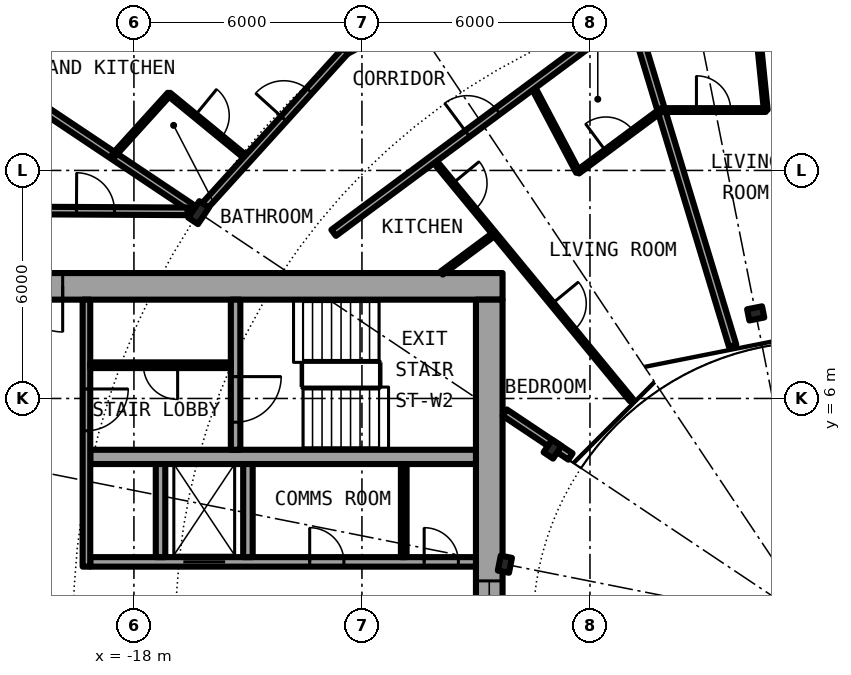
"""IFC4 building model, lengths in metres.
Left out: names, types, materials, properties, quantities, classifications, styles, units other than length and angle.
Written with IfcOpenShell. Run it as: python <this file> out.ifc"""

import sys

from ifc_helpers import new_model, si_unit, direction, frame, frame_2d, origin, origin_2d, place, context, subcontext, project, spatial, rectangle, i_section, extrude, element, fill, save


model = new_model("IFC4")
c1 = context("Model", 3, precision=1e-05, world=origin(), true_north=direction((0.0, 1.0)))
c2 = subcontext(c1, "Body", "Model", "MODEL_VIEW")
j1 = project(units=[si_unit("LENGTHUNIT", "METRE"), si_unit("PLANEANGLEUNIT", "RADIAN")], contexts=[c1])
p1 = place(None, origin())
s1 = spatial("IfcSite", under=j1, at=p1, CompositionType="ELEMENT")
p2 = place(p1, origin())
s2 = spatial("IfcBuilding", under=s1, at=p2, CompositionType="ELEMENT")
p3 = place(p2, frame((0.0, 0.0, 75.8)))
s3 = spatial("IfcBuildingStorey", under=s2, at=p3, CompositionType="ELEMENT", Elevation=75.8)
p4 = place(p3, frame((-16.297, 10.889, 0.0), z_axis=(0.0, 0.0, 1.0), x_axis=(-0.831469612303, 0.55557023302, 0.0)))
e1 = element("IfcColumn", 1, at=p4, inside=s3, PredefinedType="COLUMN", context=c2, shape_type="SweptSolid", body=[
    extrude(i_section(OverallWidth=0.306, OverallDepth=0.524, WebThickness=0.021, FlangeThickness=0.04, FilletRadius=0.027, at=origin_2d()), origin(), (0.0, 0.0, 1.0), 3.05),
])
for number, where, z_axis, x_axis in (
    (2, (-1.639, 8.239, 0.0), (0.0, 0.0, 1.0), (-0.195, 0.981, 0.0)),
    (3, (-6.984, 4.667, 0.0), (0.0, 0.0, 1.0), (-0.831, 0.556, 0.0)),
    (4, (-8.239, 1.639, 0.0), (0.0, 0.0, 1.0), (-0.981, 0.195, 0.0)),
):
    element("IfcColumn", number, at=place(p3, frame(where, z_axis=z_axis, x_axis=x_axis)), inside=s3, PredefinedType="COLUMN", context=c2, shape_type="SweptSolid", body=[
        extrude(i_section(OverallWidth=0.3, OverallDepth=0.4, WebThickness=0.013, FlangeThickness=0.024, FilletRadius=0.027, at=origin_2d()), origin(), (0.0, 0.0, 1.0), 3.05),
    ])
p5 = place(p3, frame((-19.304, 19.304, 0.0), z_axis=(0.0, 0.0, 1.0), x_axis=(-0.634382322723, -0.773019449054, 0.0)))
e5 = element("IfcWall", 5, at=p5, inside=s3, PredefinedType="SOLIDWALL", context=c2, shape_type="SweptSolid", body=[
    extrude(rectangle(XDim=5.352, YDim=0.25, at=frame_2d((2.676, 0.0))), origin(), (0.0, 0.0, 1.0), 2.7),
])
p6 = place(p5, frame((0.441, 0.0, 0.3)))
e6 = element("IfcOpeningElement", 6, at=p6, cuts=e5, PredefinedType="OPENING", context=c2, shape_type="SweptSolid", body=[
    extrude(rectangle(XDim=1.8, YDim=2.1, at=frame_2d((0.9, 1.05))), frame((0.0, 0.135, 0.0), z_axis=(0.0, -1.0, 0.0), x_axis=(1.0, 0.0, 0.0)), (0.0, 0.0, 1.0), 0.27),
])
p7 = place(p5, frame((3.51, 0.0, 0.0)))
e7 = element("IfcOpeningElement", 7, at=p7, cuts=e5, PredefinedType="OPENING", context=c2, shape_type="SweptSolid", body=[
    extrude(rectangle(XDim=1.0, YDim=2.2, at=frame_2d((0.5, 1.1))), frame((0.0, 0.135, 0.0), z_axis=(0.0, -1.0, 0.0), x_axis=(1.0, 0.0, 0.0)), (0.0, 0.0, 1.0), 0.27),
])
p8 = place(p3, frame((-8.3, 8.95, 0.0), z_axis=(0.0, 0.0, 1.0), x_axis=(-1.0, 0.0, 0.0)))
e8 = element("IfcWall", 8, at=p8, inside=s3, PredefinedType="SHEAR", context=c2, shape_type="SweptSolid", body=[
    extrude(rectangle(XDim=14.0, YDim=0.7, at=frame_2d((7.0, 0.0))), origin(), (0.0, 0.0, 1.0), 3.05),
])
p9 = place(p8, frame((11.575, 0.0, 0.0)))
e9 = element("IfcOpeningElement", 9, at=p9, cuts=e8, PredefinedType="OPENING", context=c2, shape_type="SweptSolid", body=[
    extrude(rectangle(XDim=1.2, YDim=2.3, at=frame_2d((0.6, 1.15))), frame((0.0, 0.36, 0.0), z_axis=(0.0, -1.0, 0.0), x_axis=(1.0, 0.0, 0.0)), (0.0, 0.0, 1.0), 0.72),
])
p10 = place(p3, frame((-8.65, 8.6, 0.0), z_axis=(0.0, 0.0, 1.0), x_axis=(0.0, -1.0, 0.0)))
e10 = element("IfcWall", 10, at=p10, inside=s3, PredefinedType="SHEAR", context=c2, shape_type="SweptSolid", body=[
    extrude(rectangle(XDim=17.2, YDim=0.7, at=frame_2d((8.6, 0.0))), origin(), (0.0, 0.0, 1.0), 3.05),
])
p11 = place(p10, frame((7.4, 0.0, 0.1)))
e11 = element("IfcOpeningElement", 11, at=p11, cuts=e10, PredefinedType="OPENING", context=c2, shape_type="SweptSolid", body=[
    extrude(rectangle(XDim=2.4, YDim=2.2, at=frame_2d((1.2, 1.1))), frame((0.0, 0.36, 0.0), z_axis=(0.0, -1.0, 0.0), x_axis=(1.0, 0.0, 0.0)), (0.0, 0.0, 1.0), 0.72),
])
p12 = place(p3, frame((-19.15, 1.7, 0.0), z_axis=(0.0, 0.0, 1.0), x_axis=(1.0, 0.0, 0.0)))
e12 = element("IfcWall", 12, at=p12, inside=s3, PredefinedType="SHEAR", context=c2, shape_type="SweptSolid", body=[
    extrude(rectangle(XDim=10.15, YDim=0.25, at=frame_2d((5.075, 0.0))), origin(), (0.0, 0.0, 1.0), 3.05),
])
p13 = place(p12, frame((2.45, 0.0, 0.0)))
e13 = element("IfcOpeningElement", 13, at=p13, cuts=e12, PredefinedType="OPENING", context=c2, shape_type="SweptSolid", body=[
    extrude(rectangle(XDim=1.1, YDim=2.3, at=frame_2d((0.55, 1.15))), frame((0.0, 0.135, 0.0), z_axis=(0.0, -1.0, 0.0), x_axis=(1.0, 0.0, 0.0)), (0.0, 0.0, 1.0), 0.27),
])
p14 = place(p12, frame((8.788, 0.0, 0.0)))
e14 = element("IfcOpeningElement", 14, at=p14, cuts=e12, PredefinedType="OPENING", context=c2, shape_type="SweptSolid", body=[
    extrude(rectangle(XDim=0.9, YDim=2.3, at=frame_2d((0.45, 1.15))), frame((0.0, 0.135, 0.0), z_axis=(0.0, -1.0, 0.0), x_axis=(1.0, 0.0, 0.0)), (0.0, 0.0, 1.0), 0.27),
])
p15 = place(p12, frame((5.775, 0.0, 0.0)))
e15 = element("IfcOpeningElement", 15, at=p15, cuts=e12, PredefinedType="OPENING", context=c2, shape_type="SweptSolid", body=[
    extrude(rectangle(XDim=0.9, YDim=2.3, at=frame_2d((0.45, 1.15))), frame((0.0, 0.135, 0.0), z_axis=(0.0, -1.0, 0.0), x_axis=(1.0, 0.0, 0.0)), (0.0, 0.0, 1.0), 0.27),
])
p16 = place(p3, frame((-9.0, 4.462, 0.0), z_axis=(0.0, 0.0, 1.0), x_axis=(-1.0, 0.0, 0.0)))
e16 = element("IfcWall", 16, at=p16, inside=s3, PredefinedType="SHEAR", context=c2, shape_type="SweptSolid", body=[
    extrude(rectangle(XDim=10.15, YDim=0.375, at=frame_2d((5.075, 0.0))), origin(), (0.0, 0.0, 1.0), 3.05),
])
p17 = place(p3, frame((-15.325, 8.6, 0.0), z_axis=(0.0, 0.0, 1.0), x_axis=(0.0, -1.0, 0.0)))
e17 = element("IfcWall", 17, at=p17, inside=s3, PredefinedType="SHEAR", context=c2, shape_type="SweptSolid", body=[
    extrude(rectangle(XDim=3.95, YDim=0.25, at=frame_2d((1.975, 0.0))), origin(), (0.0, 0.0, 1.0), 3.05),
])
p18 = place(p17, frame((2.025, 0.0, 0.0)))
e18 = element("IfcOpeningElement", 18, at=p18, cuts=e17, PredefinedType="OPENING", context=c2, shape_type="SweptSolid", body=[
    extrude(rectangle(XDim=1.2, YDim=2.3, at=frame_2d((0.6, 1.15))), frame((0.0, 0.135, 0.0), z_axis=(0.0, -1.0, 0.0), x_axis=(1.0, 0.0, 0.0)), (0.0, 0.0, 1.0), 0.27),
])
for number, where, z_axis, x_axis in (
    (19, (-15.0, 1.825, 0.0), (0.0, 0.0, 1.0), (0.0, 1.0, 0.0)),
    (20, (-17.3, 1.825, 0.0), (0.0, 0.0, 1.0), (0.0, 1.0, 0.0)),
):
    element("IfcWall", number, at=place(p3, frame(where, z_axis=z_axis, x_axis=x_axis)), inside=s3, PredefinedType="SOLIDWALL", context=c2, shape_type="SweptSolid", body=[
        extrude(rectangle(XDim=2.45, YDim=0.25, at=frame_2d((1.225, 0.0))), origin(), (0.0, 0.0, 1.0), 2.7),
    ])
p19 = place(p3, frame((-19.25, 8.6, 0.0), z_axis=(0.0, 0.0, 1.0), x_axis=(0.0, -1.0, 0.0)))
e21 = element("IfcWall", 21, at=p19, inside=s3, PredefinedType="SOLIDWALL", context=c2, shape_type="SweptSolid", body=[
    extrude(rectangle(XDim=7.025, YDim=0.2, at=frame_2d((3.513, 0.0))), origin(), (0.0, 0.0, 1.0), 2.7),
])
p20 = place(p19, frame((2.35, 0.0, 0.0)))
e22 = element("IfcOpeningElement", 22, at=p20, cuts=e21, PredefinedType="OPENING", context=c2, shape_type="SweptSolid", body=[
    extrude(rectangle(XDim=1.1, YDim=2.3, at=frame_2d((0.55, 1.15))), frame((0.0, 0.11, 0.0), z_axis=(0.0, -1.0, 0.0), x_axis=(1.0, 0.0, 0.0)), (0.0, 0.0, 1.0), 0.22),
])
p21 = place(p3, frame((-10.9, 1.825, 0.0), z_axis=(0.0, 0.0, 1.0), x_axis=(0.0, 1.0, 0.0)))
e23 = element("IfcWall", 23, at=p21, inside=s3, PredefinedType="PARTITIONING", context=c2, shape_type="SweptSolid", body=[
    extrude(rectangle(XDim=2.45, YDim=0.15, at=frame_2d((1.225, 0.0))), origin(), (0.0, 0.0, 1.0), 2.7),
])
p22 = place(p3, frame((-15.45, 6.875, 0.0), z_axis=(0.0, 0.0, 1.0), x_axis=(-1.0, 0.0, 0.0)))
e24 = element("IfcWall", 24, at=p22, inside=s3, PredefinedType="PARTITIONING", context=c2, shape_type="SweptSolid", body=[
    extrude(rectangle(XDim=3.7, YDim=0.15, at=frame_2d((1.85, 0.0))), origin(), (0.0, 0.0, 1.0), 2.7),
])
p23 = place(p22, frame((1.4, 0.0, 0.0)))
e25 = element("IfcOpeningElement", 25, at=p23, cuts=e24, PredefinedType="OPENING", context=c2, shape_type="SweptSolid", body=[
    extrude(rectangle(XDim=0.9, YDim=2.3, at=frame_2d((0.45, 1.15))), frame((0.0, 0.085, 0.0), z_axis=(0.0, -1.0, 0.0), x_axis=(1.0, 0.0, 0.0)), (0.0, 0.0, 1.0), 0.17),
])
p24 = place(p3, frame((-22.595, 15.098, 0.0), z_axis=(0.0, 0.0, 1.0), x_axis=(0.831382022135, -0.555701298605, 0.0)))
e26 = element("IfcWall", 26, at=p24, inside=s3, PredefinedType="PARTITIONING", context=c2, shape_type="SweptSolid", body=[
    extrude(rectangle(XDim=7.313, YDim=0.2, at=frame_2d((3.657, 0.0))), origin(), (0.0, 0.0, 1.0), 2.7),
])
p25 = place(p3, frame((-4.907, 16.172, 0.0), z_axis=(0.0, 0.0, 1.0), x_axis=(0.289977130626, -0.957033575019, 0.0)))
e27 = element("IfcWall", 27, at=p25, inside=s3, PredefinedType="PARTITIONING", context=c2, shape_type="SweptSolid", body=[
    extrude(rectangle(XDim=9.18, YDim=0.2, at=frame_2d((4.59, 0.0))), origin(), (0.0, 0.0, 1.0), 2.7),
])
p26 = place(p3, frame((-17.243, 21.005, 0.0), z_axis=(0.0, 0.0, 1.0), x_axis=(0.63447412651, -0.772944100689, 0.0)))
e28 = element("IfcWall", 28, at=p26, inside=s3, PredefinedType="PARTITIONING", context=c2, shape_type="SweptSolid", body=[
    extrude(rectangle(XDim=7.576, YDim=0.2, at=frame_2d((3.788, 0.0))), origin(), (0.0, 0.0, 1.0), 2.7),
])
p27 = place(p3, frame((-17.078, 14.005, 0.0), z_axis=(0.0, 0.0, 1.0), x_axis=(0.773240932873, -0.634112339992, 0.0)))
e29 = element("IfcWall", 29, at=p27, inside=s3, PredefinedType="PARTITIONING", context=c2, shape_type="SweptSolid", body=[
    extrude(rectangle(XDim=2.674, YDim=0.1, at=frame_2d((1.337, 0.0))), origin(), (0.0, 0.0, 1.0), 2.7),
])
p28 = place(p27, frame((0.887, 0.0, 0.0)))
e30 = element("IfcOpeningElement", 30, at=p28, cuts=e29, PredefinedType="OPENING", context=c2, shape_type="SweptSolid", body=[
    extrude(rectangle(XDim=0.9, YDim=2.3, at=frame_2d((0.45, 1.15))), frame((0.0, 0.06, 0.0), z_axis=(0.0, -1.0, 0.0), x_axis=(1.0, 0.0, 0.0)), (0.0, 0.0, 1.0), 0.12),
])
p29 = place(p3, frame((-10.132, 12.296, 0.0), z_axis=(0.0, 0.0, 1.0), x_axis=(0.635976043025, -0.771708800454, 0.0)))
e31 = element("IfcWall", 31, at=p29, inside=s3, PredefinedType="PARTITIONING", context=c2, shape_type="SweptSolid", body=[
    extrude(rectangle(XDim=8.213, YDim=0.1, at=frame_2d((4.106, 0.0))), origin(), (0.0, 0.0, 1.0), 2.7),
])
p30 = place(p29, frame((0.823, 0.0, 0.0)))
e32 = element("IfcOpeningElement", 32, at=p30, cuts=e31, PredefinedType="OPENING", context=c2, shape_type="SweptSolid", body=[
    extrude(rectangle(XDim=0.9, YDim=2.3, at=frame_2d((0.45, 1.15))), frame((0.0, 0.06, 0.0), z_axis=(0.0, -1.0, 0.0), x_axis=(1.0, 0.0, 0.0)), (0.0, 0.0, 1.0), 0.12),
])
p31 = place(p29, frame((4.929, 0.0, 0.0)))
e33 = element("IfcOpeningElement", 33, at=p31, cuts=e31, PredefinedType="OPENING", context=c2, shape_type="SweptSolid", body=[
    extrude(rectangle(XDim=0.9, YDim=2.3, at=frame_2d((0.45, 1.15))), frame((0.0, 0.06, 0.0), z_axis=(0.0, -1.0, 0.0), x_axis=(1.0, 0.0, 0.0)), (0.0, 0.0, 1.0), 0.12),
])
p32 = place(p3, frame((-7.519, 14.234, 0.0), z_axis=(0.0, 0.0, 1.0), x_axis=(0.467001992543, -0.884256263173, 0.0)))
e34 = element("IfcWall", 34, at=p32, inside=s3, PredefinedType="PARTITIONING", context=c2, shape_type="SweptSolid", body=[
    extrude(rectangle(XDim=2.572, YDim=0.1, at=frame_2d((1.286, 0.0))), origin(), (0.0, 0.0, 1.0), 2.7),
])
p33 = place(p3, frame((-1.635, 16.172, 0.0), z_axis=(0.0, 0.0, 1.0), x_axis=(0.100527855112, -0.994934244233, 0.0)))
e35 = element("IfcWall", 35, at=p33, inside=s3, PredefinedType="PARTITIONING", context=c2, shape_type="SweptSolid", body=[
    extrude(rectangle(XDim=2.596, YDim=0.1, at=frame_2d((1.298, 0.0))), origin(), (0.0, 0.0, 1.0), 2.7),
])
p34 = place(p3, frame((-6.513, 4.472, 0.0), z_axis=(0.0, 0.0, 1.0), x_axis=(-0.831382204863, 0.555701025225, 0.0)))
e36 = element("IfcWall", 36, at=p34, inside=s3, PredefinedType="PARTITIONING", context=c2, shape_type="SweptSolid", body=[
    extrude(rectangle(XDim=2.082, YDim=0.2, at=frame_2d((1.041, 0.0))), origin(), (0.0, 0.0, 1.0), 2.7),
])
p35 = place(p3, frame((-21.675, 10.95, 0.0), z_axis=(0.0, 0.0, 1.0), x_axis=(0.999987054722, -0.005088259783, 0.0)))
e37 = element("IfcWall", 37, at=p35, inside=s3, PredefinedType="PARTITIONING", context=c2, shape_type="SweptSolid", body=[
    extrude(rectangle(XDim=5.086, YDim=0.2, at=frame_2d((2.543, 0.0))), origin(), (0.0, 0.0, 1.0), 2.7),
])
p36 = place(p35, frame((2.163, 0.0, 0.0)))
e38 = element("IfcOpeningElement", 38, at=p36, cuts=e37, PredefinedType="OPENING", context=c2, shape_type="SweptSolid", body=[
    extrude(rectangle(XDim=1.0, YDim=2.3, at=frame_2d((0.5, 1.15))), frame((0.0, 0.11, 0.0), z_axis=(0.0, -1.0, 0.0), x_axis=(1.0, 0.0, 0.0)), (0.0, 0.0, 1.0), 0.22),
])
p37 = place(p3, frame((-9.903, 9.3, 0.0), z_axis=(0.0, 0.0, 1.0), x_axis=(0.803135014325, 0.595797070121, 0.0)))
e39 = element("IfcWall", 39, at=p37, inside=s3, PredefinedType="PARTITIONING", context=c2, shape_type="SweptSolid", body=[
    extrude(rectangle(XDim=1.732, YDim=0.1, at=frame_2d((0.866, 0.0))), origin(), (0.0, 0.0, 1.0), 2.7),
])
p38 = place(p3, frame((-6.318, 11.96, 0.0), z_axis=(0.0, 0.0, 1.0), x_axis=(0.803128348509, 0.595806055542, 0.0)))
e40 = element("IfcWall", 40, at=p38, inside=s3, PredefinedType="PARTITIONING", context=c2, shape_type="SweptSolid", body=[
    extrude(rectangle(XDim=2.734, YDim=0.1, at=frame_2d((1.367, 0.0))), origin(), (0.0, 0.0, 1.0), 2.7),
])
p39 = place(p38, frame((0.917, 0.0, 0.0)))
e41 = element("IfcOpeningElement", 41, at=p39, cuts=e40, PredefinedType="OPENING", context=c2, shape_type="SweptSolid", body=[
    extrude(rectangle(XDim=0.9, YDim=2.3, at=frame_2d((0.45, 1.15))), frame((0.0, 0.06, 0.0), z_axis=(0.0, -1.0, 0.0), x_axis=(1.0, 0.0, 0.0)), (0.0, 0.0, 1.0), 0.12),
])
p40 = place(p3, frame((-4.122, 13.589, 0.0), z_axis=(0.0, 0.0, 1.0), x_axis=(1.0, 0.0, 0.0)))
e42 = element("IfcWall", 42, at=p40, inside=s3, PredefinedType="PARTITIONING", context=c2, shape_type="SweptSolid", body=[
    extrude(rectangle(XDim=2.748, YDim=0.1, at=frame_2d((1.374, 0.0))), origin(), (0.0, 0.0, 1.0), 2.7),
])
p41 = place(p40, frame((0.924, 0.0, 0.0)))
e43 = element("IfcOpeningElement", 43, at=p41, cuts=e42, PredefinedType="OPENING", context=c2, shape_type="SweptSolid", body=[
    extrude(rectangle(XDim=0.9, YDim=2.3, at=frame_2d((0.45, 1.15))), frame((0.0, 0.06, 0.0), z_axis=(0.0, -1.0, 0.0), x_axis=(1.0, 0.0, 0.0)), (0.0, 0.0, 1.0), 0.12),
])
p42 = place(p3, frame((-12.745, 10.358, 0.0), z_axis=(0.0, 0.0, 1.0), x_axis=(0.803191461888, 0.595720971219, 0.0)))
e44 = element("IfcWall", 44, at=p42, inside=s3, PredefinedType="PARTITIONING", context=c2, shape_type="SweptSolid", body=[
    extrude(rectangle(XDim=9.76, YDim=0.2, at=frame_2d((4.88, 0.0))), origin(), (0.0, 0.0, 1.0), 2.7),
])
p43 = place(p42, frame((4.38, 0.0, 0.0)))
e45 = element("IfcOpeningElement", 45, at=p43, cuts=e44, PredefinedType="OPENING", context=c2, shape_type="SweptSolid", body=[
    extrude(rectangle(XDim=1.0, YDim=2.3, at=frame_2d((0.5, 1.15))), frame((0.0, 0.11, 0.0), z_axis=(0.0, -1.0, 0.0), x_axis=(1.0, 0.0, 0.0)), (0.0, 0.0, 1.0), 0.22),
])
p44 = place(p3, frame((-12.434, 15.151, 0.0), z_axis=(0.0, 0.0, 1.0), x_axis=(0.881899173092, 0.47143806433, 0.0)))
e46 = element("IfcWall", 46, at=p44, inside=s3, PredefinedType="PARTITIONING", context=c2, shape_type="SweptSolid", body=[
    extrude(rectangle(XDim=7.647, YDim=0.2, at=frame_2d((3.824, 0.0))), origin(), (0.0, 0.0, 1.0), 2.38),
])
p45 = place(p44, frame((2.55, 0.0, 0.0)))
e47 = element("IfcOpeningElement", 47, at=p45, cuts=e46, PredefinedType="OPENING", context=c2, shape_type="SweptSolid", body=[
    extrude(rectangle(XDim=1.0, YDim=2.3, at=frame_2d((0.5, 1.15))), frame((0.0, 0.11, 0.0), z_axis=(0.0, -1.0, 0.0), x_axis=(1.0, 0.0, 0.0)), (0.0, 0.0, 1.0), 0.22),
])
p46 = place(p3, frame((-16.193, 11.004, 0.0), z_axis=(0.0, 0.0, 1.0), x_axis=(0.671601747072, 0.740912338492, 0.0)))
e48 = element("IfcWall", 48, at=p46, inside=s3, PredefinedType="PARTITIONING", context=c2, shape_type="SweptSolid", body=[
    extrude(rectangle(XDim=5.597, YDim=0.2, at=frame_2d((2.799, 0.0))), origin(), (0.0, 0.0, 1.0), 2.38),
])
p47 = place(p46, frame((3.18, 0.0, 0.0)))
e49 = element("IfcOpeningElement", 49, at=p47, cuts=e48, PredefinedType="OPENING", context=c2, shape_type="SweptSolid", body=[
    extrude(rectangle(XDim=1.0, YDim=2.3, at=frame_2d((0.5, 1.15))), frame((0.0, 0.11, 0.0), z_axis=(0.0, -1.0, 0.0), x_axis=(1.0, 0.0, 0.0)), (0.0, 0.0, 1.0), 0.22),
])
p48 = place(p3, frame((-18.538, 12.394, 0.0), z_axis=(0.0, 0.0, 1.0), x_axis=(0.67169789574, 0.740825172937, 0.0)))
e50 = element("IfcWall", 50, at=p48, inside=s3, PredefinedType="PARTITIONING", context=c2, shape_type="SweptSolid", body=[
    extrude(rectangle(XDim=2.183, YDim=0.1, at=frame_2d((1.091, 0.0))), origin(), (0.0, 0.0, 1.0), 2.7),
])
p49 = place(p13, origin())
e51 = element("IfcDoor", 51, at=p49, inside=s3, OperationType="DOUBLE_DOOR_SLIDING", PredefinedType="DOOR", context=c2, shape_type="SweptSolid", body=[
    extrude(rectangle(XDim=1.1, YDim=2.3, at=frame_2d((0.55, 1.15))), frame((0.0, 0.025, 0.0), z_axis=(0.0, -1.0, 0.0), x_axis=(1.0, 0.0, 0.0)), (0.0, 0.0, 1.0), 0.05),
])
fill(e13, e51)
p50 = place(p14, origin())
e52 = element("IfcDoor", 52, at=p50, inside=s3, OperationType="SINGLE_SWING_LEFT", PredefinedType="DOOR", context=c2, shape_type="SweptSolid", body=[
    extrude(rectangle(XDim=0.9, YDim=2.3, at=frame_2d((0.45, 1.15))), frame((0.0, 0.025, 0.0), z_axis=(0.0, -1.0, 0.0), x_axis=(1.0, 0.0, 0.0)), (0.0, 0.0, 1.0), 0.05),
])
fill(e14, e52)
p51 = place(p15, origin())
e53 = element("IfcDoor", 53, at=p51, inside=s3, OperationType="SINGLE_SWING_LEFT", PredefinedType="DOOR", context=c2, shape_type="SweptSolid", body=[
    extrude(rectangle(XDim=0.9, YDim=2.3, at=frame_2d((0.45, 1.15))), frame((0.0, 0.025, 0.0), z_axis=(0.0, -1.0, 0.0), x_axis=(1.0, 0.0, 0.0)), (0.0, 0.0, 1.0), 0.05),
])
fill(e15, e53)
p52 = place(p23, origin())
e54 = element("IfcDoor", 54, at=p52, inside=s3, OperationType="SINGLE_SWING_LEFT", PredefinedType="DOOR", context=c2, shape_type="SweptSolid", body=[
    extrude(rectangle(XDim=0.9, YDim=2.3, at=frame_2d((0.45, 1.15))), frame((0.0, 0.025, 0.0), z_axis=(0.0, -1.0, 0.0), x_axis=(1.0, 0.0, 0.0)), (0.0, 0.0, 1.0), 0.05),
])
fill(e25, e54)
p53 = place(p18, origin())
e55 = element("IfcDoor", 55, at=p53, inside=s3, OperationType="SINGLE_SWING_LEFT", PredefinedType="DOOR", context=c2, shape_type="SweptSolid", body=[
    extrude(rectangle(XDim=1.2, YDim=2.3, at=frame_2d((0.6, 1.15))), frame((0.0, 0.025, 0.0), z_axis=(0.0, -1.0, 0.0), x_axis=(1.0, 0.0, 0.0)), (0.0, 0.0, 1.0), 0.05),
])
fill(e18, e55)
p54 = place(p20, origin())
e56 = element("IfcDoor", 56, at=p54, inside=s3, OperationType="SINGLE_SWING_RIGHT", PredefinedType="DOOR", context=c2, shape_type="SweptSolid", body=[
    extrude(rectangle(XDim=1.1, YDim=2.3, at=frame_2d((0.55, 1.15))), frame((0.0, 0.025, 0.0), z_axis=(0.0, -1.0, 0.0), x_axis=(1.0, 0.0, 0.0)), (0.0, 0.0, 1.0), 0.05),
])
fill(e22, e56)
p55 = place(p9, origin())
e57 = element("IfcDoor", 57, at=p55, inside=s3, OperationType="SINGLE_SWING_LEFT", PredefinedType="DOOR", context=c2, shape_type="SweptSolid", body=[
    extrude(rectangle(XDim=1.2, YDim=2.3, at=frame_2d((0.6, 1.15))), frame((0.0, 0.025, 0.0), z_axis=(0.0, -1.0, 0.0), x_axis=(1.0, 0.0, 0.0)), (0.0, 0.0, 1.0), 0.05),
])
fill(e9, e57)
p56 = place(p11, origin())
e58 = element("IfcWindow", 58, at=p56, inside=s3, PartitioningType="SINGLE_PANEL", PredefinedType="WINDOW", context=c2, shape_type="SweptSolid", body=[
    extrude(rectangle(XDim=2.4, YDim=2.2, at=frame_2d((1.2, 1.1))), frame((0.0, 0.03, 0.0), z_axis=(0.0, -1.0, 0.0), x_axis=(1.0, 0.0, 0.0)), (0.0, 0.0, 1.0), 0.06),
])
fill(e11, e58)
p57 = place(p47, origin())
e59 = element("IfcDoor", 59, at=p57, inside=s3, OperationType="SINGLE_SWING_RIGHT", PredefinedType="DOOR", context=c2, shape_type="SweptSolid", body=[
    extrude(rectangle(XDim=1.0, YDim=2.3, at=frame_2d((0.5, 1.15))), frame((0.0, 0.025, 0.0), z_axis=(0.0, -1.0, 0.0), x_axis=(1.0, 0.0, 0.0)), (0.0, 0.0, 1.0), 0.05),
])
fill(e49, e59)
p58 = place(p28, origin())
e60 = element("IfcDoor", 60, at=p58, inside=s3, OperationType="SINGLE_SWING_RIGHT", PredefinedType="DOOR", context=c2, shape_type="SweptSolid", body=[
    extrude(rectangle(XDim=0.9, YDim=2.3, at=frame_2d((0.45, 1.15))), frame((0.0, 0.025, 0.0), z_axis=(0.0, -1.0, 0.0), x_axis=(1.0, 0.0, 0.0)), (0.0, 0.0, 1.0), 0.05),
])
fill(e30, e60)
p59 = place(p41, origin())
e61 = element("IfcDoor", 61, at=p59, inside=s3, OperationType="SINGLE_SWING_LEFT", PredefinedType="DOOR", context=c2, shape_type="SweptSolid", body=[
    extrude(rectangle(XDim=0.9, YDim=2.3, at=frame_2d((0.45, 1.15))), frame((0.0, 0.025, 0.0), z_axis=(0.0, -1.0, 0.0), x_axis=(1.0, 0.0, 0.0)), (0.0, 0.0, 1.0), 0.05),
])
fill(e43, e61)
p60 = place(p43, origin())
e62 = element("IfcDoor", 62, at=p60, inside=s3, OperationType="SINGLE_SWING_RIGHT", PredefinedType="DOOR", context=c2, shape_type="SweptSolid", body=[
    extrude(rectangle(XDim=1.0, YDim=2.3, at=frame_2d((0.5, 1.15))), frame((0.0, 0.025, 0.0), z_axis=(0.0, -1.0, 0.0), x_axis=(1.0, 0.0, 0.0)), (0.0, 0.0, 1.0), 0.05),
])
fill(e45, e62)
p61 = place(p39, origin())
e63 = element("IfcDoor", 63, at=p61, inside=s3, OperationType="SINGLE_SWING_RIGHT", PredefinedType="DOOR", context=c2, shape_type="SweptSolid", body=[
    extrude(rectangle(XDim=0.9, YDim=2.3, at=frame_2d((0.45, 1.15))), frame((0.0, 0.025, 0.0), z_axis=(0.0, -1.0, 0.0), x_axis=(1.0, 0.0, 0.0)), (0.0, 0.0, 1.0), 0.05),
])
fill(e41, e63)
p62 = place(p30, origin())
e64 = element("IfcDoor", 64, at=p62, inside=s3, OperationType="SINGLE_SWING_LEFT", PredefinedType="DOOR", context=c2, shape_type="SweptSolid", body=[
    extrude(rectangle(XDim=0.9, YDim=2.3, at=frame_2d((0.45, 1.15))), frame((0.0, 0.025, 0.0), z_axis=(0.0, -1.0, 0.0), x_axis=(1.0, 0.0, 0.0)), (0.0, 0.0, 1.0), 0.05),
])
fill(e32, e64)
p63 = place(p31, origin())
e65 = element("IfcDoor", 65, at=p63, inside=s3, OperationType="SINGLE_SWING_RIGHT", PredefinedType="DOOR", context=c2, shape_type="SweptSolid", body=[
    extrude(rectangle(XDim=0.9, YDim=2.3, at=frame_2d((0.45, 1.15))), frame((0.0, 0.025, 0.0), z_axis=(0.0, -1.0, 0.0), x_axis=(1.0, 0.0, 0.0)), (0.0, 0.0, 1.0), 0.05),
])
fill(e33, e65)
p64 = place(p36, origin())
e66 = element("IfcDoor", 66, at=p64, inside=s3, OperationType="SINGLE_SWING_RIGHT", PredefinedType="DOOR", context=c2, shape_type="SweptSolid", body=[
    extrude(rectangle(XDim=1.0, YDim=2.3, at=frame_2d((0.5, 1.15))), frame((0.0, 0.025, 0.0), z_axis=(0.0, -1.0, 0.0), x_axis=(1.0, 0.0, 0.0)), (0.0, 0.0, 1.0), 0.05),
])
fill(e38, e66)
save(model, sys.argv[1])
